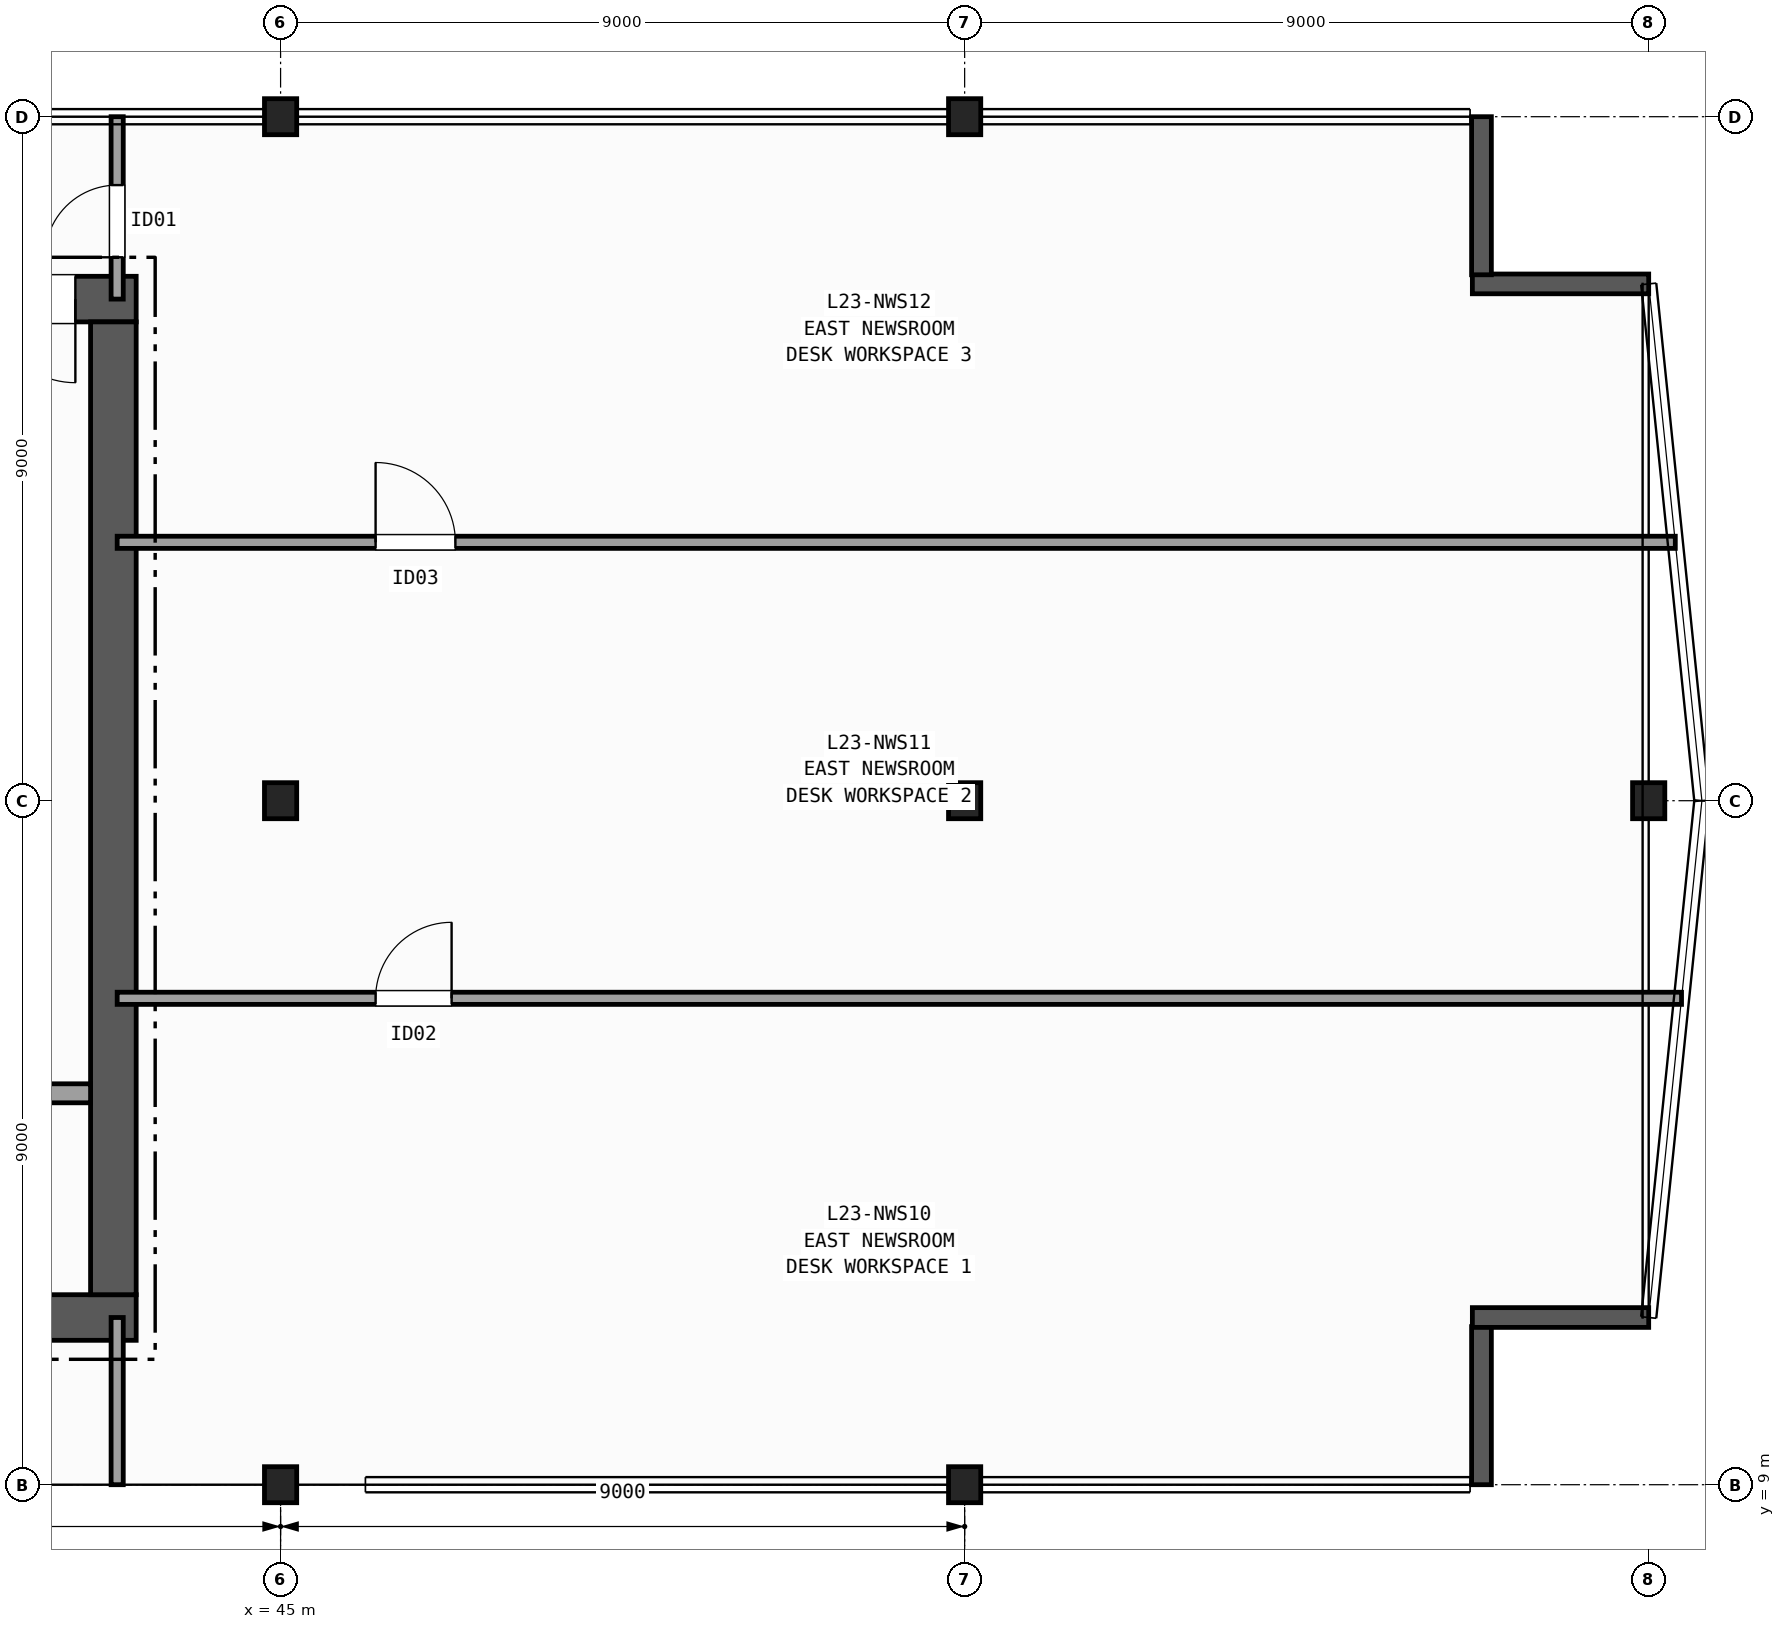
"""IFC4 building model, lengths in metres.
Left out: names, types, materials, properties, quantities, classifications, styles, units other than length and angle.
Written with IfcOpenShell. Run it as: python <this file> out.ifc"""

import sys

from ifc_helpers import new_model, si_unit, direction, frame, frame_2d, origin, origin_2d, place, context, subcontext, project, spatial, rectangle, i_section, extrude, element, fill, save


model = new_model("IFC4")
c1 = context("Model", 3, precision=1e-05, world=origin(), true_north=direction((0.0, 1.0)))
c2 = subcontext(c1, "Body", "Model", "MODEL_VIEW")
j1 = project(units=[si_unit("LENGTHUNIT", "METRE"), si_unit("PLANEANGLEUNIT", "RADIAN")], contexts=[c1])
p1 = place(None, origin())
s1 = spatial("IfcSite", under=j1, at=p1, CompositionType="ELEMENT")
p2 = place(p1, origin())
s2 = spatial("IfcBuilding", under=s1, at=p2, CompositionType="ELEMENT")
p3 = place(p2, frame((0.0, 0.0, 96.5)))
s3 = spatial("IfcBuildingStorey", under=s2, at=p3, CompositionType="ELEMENT", Elevation=96.5)
for number, where, z_axis, x_axis in (
    (1, (45.0, 9.0, 0.0), (0.0, 0.0, 1.0), (1.0, 0.0, 0.0)),
    (2, (45.0, 18.0, 0.0), (0.0, 0.0, 1.0), (1.0, 0.0, 0.0)),
    (3, (45.0, 27.0, 0.0), (0.0, 0.0, 1.0), (1.0, 0.0, 0.0)),
    (4, (54.0, 9.0, 0.0), (0.0, 0.0, 1.0), (1.0, 0.0, 0.0)),
    (5, (54.0, 18.0, 0.0), (0.0, 0.0, 1.0), (1.0, 0.0, 0.0)),
    (6, (54.0, 27.0, 0.0), (0.0, 0.0, 1.0), (1.0, 0.0, 0.0)),
    (7, (63.0, 18.0, 0.0), (0.0, 0.0, 1.0), (1.0, 0.0, 0.0)),
):
    element("IfcColumn", number, at=place(p3, frame(where, z_axis=z_axis, x_axis=x_axis)), inside=s3, PredefinedType="COLUMN", context=c2, shape_type="SweptSolid", body=[
        extrude(i_section(OverallWidth=0.424, OverallDepth=0.474, WebThickness=0.048, FlangeThickness=0.077, FilletRadius=0.015, at=origin_2d()), origin(), (0.0, 0.0, 1.0), 3.7),
    ])
p4 = place(p3, frame((60.8, 9.0, 0.0), z_axis=(0.0, 0.0, 1.0), x_axis=(0.0, 1.0, 0.0)))
e8 = element("IfcWall", 8, at=p4, inside=s3, PredefinedType="SOLIDWALL", context=c2, shape_type="SweptSolid", body=[
    extrude(rectangle(XDim=2.08, YDim=0.26, at=frame_2d((1.04, 0.0))), origin(), (0.0, 0.0, 1.0), 3.37),
])
for number, where, z_axis, x_axis in (
    (9, (60.68, 11.2, 0.0), (0.0, 0.0, 1.0), (1.0, 0.0, 0.0)),
    (10, (63.0, 24.8, 0.0), (0.0, 0.0, 1.0), (-1.0, 0.0, 0.0)),
):
    element("IfcWall", number, at=place(p3, frame(where, z_axis=z_axis, x_axis=x_axis)), inside=s3, PredefinedType="SOLIDWALL", context=c2, shape_type="SweptSolid", body=[
        extrude(rectangle(XDim=2.32, YDim=0.26, at=frame_2d((1.16, 0.0))), origin(), (0.0, 0.0, 1.0), 3.37),
    ])
p5 = place(p3, frame((60.8, 24.92, 0.0), z_axis=(0.0, 0.0, 1.0), x_axis=(0.0, 1.0, 0.0)))
e11 = element("IfcWall", 11, at=p5, inside=s3, PredefinedType="SOLIDWALL", context=c2, shape_type="SweptSolid", body=[
    extrude(rectangle(XDim=2.08, YDim=0.26, at=frame_2d((1.04, 0.0))), origin(), (0.0, 0.0, 1.0), 3.37),
])
p6 = place(p3, frame((29.1, 11.2, 0.0), z_axis=(0.0, 0.0, 1.0), x_axis=(1.0, 0.0, 0.0)))
e12 = element("IfcWall", 12, at=p6, inside=s3, PredefinedType="SHEAR", context=c2, shape_type="SweptSolid", body=[
    extrude(rectangle(XDim=14.0, YDim=0.6, at=frame_2d((7.0, 0.0))), origin(), (0.0, 0.0, 1.0), 3.37),
])
p7 = place(p3, frame((43.1, 24.6, 0.0), z_axis=(0.0, 0.0, 1.0), x_axis=(-1.0, 0.0, 0.0)))
e13 = element("IfcWall", 13, at=p7, inside=s3, PredefinedType="SHEAR", context=c2, shape_type="SweptSolid", body=[
    extrude(rectangle(XDim=14.0, YDim=0.6, at=frame_2d((7.0, 0.0))), origin(), (0.0, 0.0, 1.0), 3.37),
])
p8 = place(p7, frame((0.8, 0.0, 0.0)))
e14 = element("IfcOpeningElement", 14, at=p8, cuts=e13, PredefinedType="OPENING", context=c2, shape_type="SweptSolid", body=[
    extrude(rectangle(XDim=1.1, YDim=2.15, at=frame_2d((0.55, 1.075))), frame((0.0, 0.31, 0.0), z_axis=(0.0, -1.0, 0.0), x_axis=(1.0, 0.0, 0.0)), (0.0, 0.0, 1.0), 0.62),
])
p9 = place(p7, frame((2.75, 0.0, 0.0)))
e15 = element("IfcOpeningElement", 15, at=p9, cuts=e13, PredefinedType="OPENING", context=c2, shape_type="SweptSolid", body=[
    extrude(rectangle(XDim=0.9, YDim=2.1, at=frame_2d((0.45, 1.05))), frame((0.0, 0.31, 0.0), z_axis=(0.0, -1.0, 0.0), x_axis=(1.0, 0.0, 0.0)), (0.0, 0.0, 1.0), 0.62),
])
p10 = place(p7, frame((4.65, 0.0, 0.0)))
e16 = element("IfcOpeningElement", 16, at=p10, cuts=e13, PredefinedType="OPENING", context=c2, shape_type="SweptSolid", body=[
    extrude(rectangle(XDim=0.9, YDim=2.1, at=frame_2d((0.45, 1.05))), frame((0.0, 0.31, 0.0), z_axis=(0.0, -1.0, 0.0), x_axis=(1.0, 0.0, 0.0)), (0.0, 0.0, 1.0), 0.62),
])
p11 = place(p3, frame((42.8, 11.5, 0.0), z_axis=(0.0, 0.0, 1.0), x_axis=(0.0, 1.0, 0.0)))
e17 = element("IfcWall", 17, at=p11, inside=s3, PredefinedType="SHEAR", context=c2, shape_type="SweptSolid", body=[
    extrude(rectangle(XDim=12.8, YDim=0.6, at=frame_2d((6.4, 0.0))), origin(), (0.0, 0.0, 1.0), 3.37),
])
p12 = place(p3, frame((33.07, 14.15, 0.0), z_axis=(0.0, 0.0, 1.0), x_axis=(1.0, 0.0, 0.0)))
e18 = element("IfcWall", 18, at=p12, inside=s3, PredefinedType="PARTITIONING", context=c2, shape_type="SweptSolid", body=[
    extrude(rectangle(XDim=9.43, YDim=0.25, at=frame_2d((4.715, 0.0))), origin(), (0.0, 0.0, 1.0), 3.37),
])
p13 = place(p12, frame((0.755, 0.0, 0.0)))
e19 = element("IfcOpeningElement", 19, at=p13, cuts=e18, PredefinedType="OPENING", context=c2, shape_type="SweptSolid", body=[
    extrude(rectangle(XDim=1.15, YDim=2.15, at=frame_2d((0.575, 1.075))), frame((0.0, 0.135, 0.0), z_axis=(0.0, -1.0, 0.0), x_axis=(1.0, 0.0, 0.0)), (0.0, 0.0, 1.0), 0.27),
])
p14 = place(p12, frame((3.355, 0.0, 0.0)))
e20 = element("IfcOpeningElement", 20, at=p14, cuts=e18, PredefinedType="OPENING", context=c2, shape_type="SweptSolid", body=[
    extrude(rectangle(XDim=1.15, YDim=2.15, at=frame_2d((0.575, 1.075))), frame((0.0, 0.135, 0.0), z_axis=(0.0, -1.0, 0.0), x_axis=(1.0, 0.0, 0.0)), (0.0, 0.0, 1.0), 0.27),
])
p15 = place(p3, frame((42.85, 9.0, 0.0), z_axis=(0.0, 0.0, 1.0), x_axis=(0.0, 1.0, 0.0)))
e21 = element("IfcWall", 21, at=p15, inside=s3, PredefinedType="PARTITIONING", context=c2, shape_type="SweptSolid", body=[
    extrude(rectangle(XDim=2.2, YDim=0.16, at=frame_2d((1.1, 0.0))), origin(), (0.0, 0.0, 1.0), 2.577),
])
p16 = place(p3, frame((42.85, 24.6, 0.0), z_axis=(0.0, 0.0, 1.0), x_axis=(0.0, 1.0, 0.0)))
e22 = element("IfcWall", 22, at=p16, inside=s3, PredefinedType="PARTITIONING", context=c2, shape_type="SweptSolid", body=[
    extrude(rectangle(XDim=2.4, YDim=0.16, at=frame_2d((1.2, 0.0))), origin(), (0.0, 0.0, 1.0), 2.577),
])
p17 = place(p16, frame((0.55, 0.0, 0.0)))
e23 = element("IfcOpeningElement", 23, at=p17, cuts=e22, PredefinedType="OPENING", context=c2, shape_type="SweptSolid", body=[
    extrude(rectangle(XDim=0.95, YDim=2.1, at=frame_2d((0.475, 1.05))), frame((0.0, 0.09, 0.0), z_axis=(0.0, -1.0, 0.0), x_axis=(1.0, 0.0, 0.0)), (0.0, 0.0, 1.0), 0.18),
])
p18 = place(p3, frame((42.85, 15.4, 0.0), z_axis=(0.0, 0.0, 1.0), x_axis=(1.0, 0.0, 0.0)))
e24 = element("IfcWall", 24, at=p18, inside=s3, PredefinedType="PARTITIONING", context=c2, shape_type="SweptSolid", body=[
    extrude(rectangle(XDim=20.582, YDim=0.16, at=frame_2d((10.291, 0.0))), origin(), (0.0, 0.0, 1.0), 3.37),
])
p19 = place(p18, frame((3.4, 0.0, 0.0)))
e25 = element("IfcOpeningElement", 25, at=p19, cuts=e24, PredefinedType="OPENING", context=c2, shape_type="SweptSolid", body=[
    extrude(rectangle(XDim=1.0, YDim=2.1, at=frame_2d((0.5, 1.05))), frame((0.0, 0.09, 0.0), z_axis=(0.0, -1.0, 0.0), x_axis=(1.0, 0.0, 0.0)), (0.0, 0.0, 1.0), 0.18),
])
p20 = place(p3, frame((42.85, 21.4, 0.0), z_axis=(0.0, 0.0, 1.0), x_axis=(1.0, 0.0, 0.0)))
e26 = element("IfcWall", 26, at=p20, inside=s3, PredefinedType="PARTITIONING", context=c2, shape_type="SweptSolid", body=[
    extrude(rectangle(XDim=20.5, YDim=0.16, at=frame_2d((10.25, 0.0))), origin(), (0.0, 0.0, 1.0), 3.37),
])
p21 = place(p20, frame((3.4, 0.0, 0.0)))
e27 = element("IfcOpeningElement", 27, at=p21, cuts=e26, PredefinedType="OPENING", context=c2, shape_type="SweptSolid", body=[
    extrude(rectangle(XDim=1.05, YDim=2.15, at=frame_2d((0.525, 1.075))), frame((0.0, 0.09, 0.0), z_axis=(0.0, -1.0, 0.0), x_axis=(1.0, 0.0, 0.0)), (0.0, 0.0, 1.0), 0.18),
])
p22 = place(p8, origin())
e28 = element("IfcDoor", 28, at=p22, inside=s3, OperationType="SINGLE_SWING_LEFT", PredefinedType="DOOR", context=c2, shape_type="SweptSolid", body=[
    extrude(rectangle(XDim=1.1, YDim=2.15, at=frame_2d((0.55, 1.075))), frame((0.0, 0.025, 0.0), z_axis=(0.0, -1.0, 0.0), x_axis=(1.0, 0.0, 0.0)), (0.0, 0.0, 1.0), 0.05),
])
fill(e14, e28)
p23 = place(p17, origin())
e29 = element("IfcDoor", 29, at=p23, inside=s3, OperationType="SINGLE_SWING_LEFT", PredefinedType="DOOR", context=c2, shape_type="SweptSolid", body=[
    extrude(rectangle(XDim=0.95, YDim=2.1, at=frame_2d((0.475, 1.05))), frame((0.0, 0.025, 0.0), z_axis=(0.0, -1.0, 0.0), x_axis=(1.0, 0.0, 0.0)), (0.0, 0.0, 1.0), 0.05),
])
fill(e23, e29)
p24 = place(p19, origin())
e30 = element("IfcDoor", 30, at=p24, inside=s3, OperationType="SINGLE_SWING_RIGHT", PredefinedType="DOOR", context=c2, shape_type="SweptSolid", body=[
    extrude(rectangle(XDim=1.0, YDim=2.1, at=frame_2d((0.5, 1.05))), frame((0.0, 0.025, 0.0), z_axis=(0.0, -1.0, 0.0), x_axis=(1.0, 0.0, 0.0)), (0.0, 0.0, 1.0), 0.05),
])
fill(e25, e30)
p25 = place(p21, origin())
e31 = element("IfcDoor", 31, at=p25, inside=s3, OperationType="SINGLE_SWING_LEFT", PredefinedType="DOOR", context=c2, shape_type="SweptSolid", body=[
    extrude(rectangle(XDim=1.05, YDim=2.15, at=frame_2d((0.525, 1.075))), frame((0.0, 0.025, 0.0), z_axis=(0.0, -1.0, 0.0), x_axis=(1.0, 0.0, 0.0)), (0.0, 0.0, 1.0), 0.05),
])
fill(e27, e31)
save(model, sys.argv[1])
